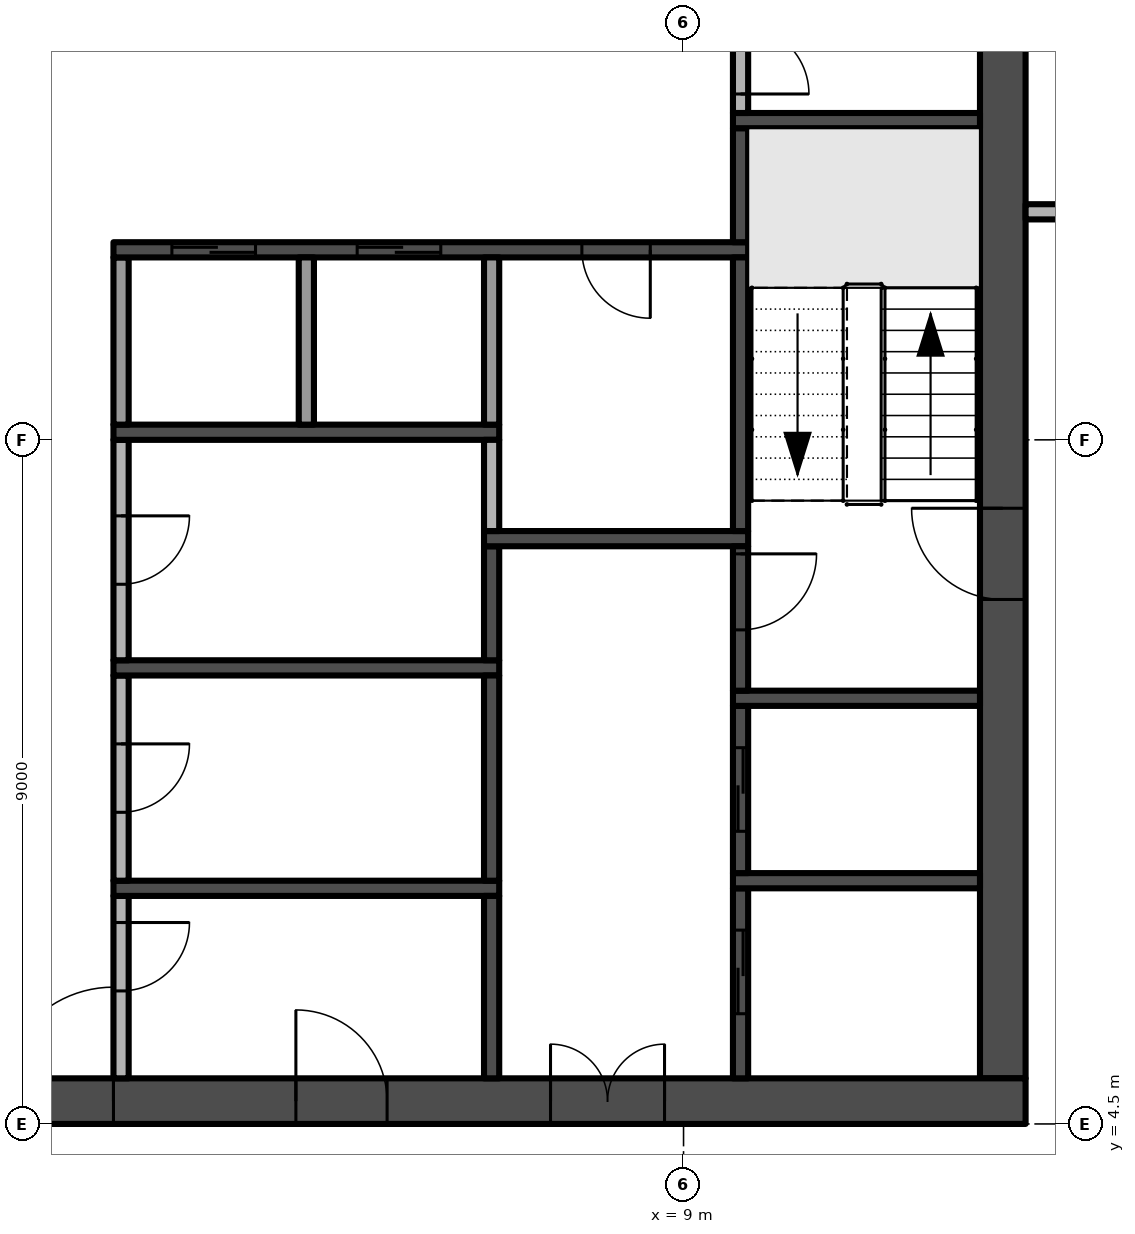
"""IFC4 building model, lengths in metres.
Left out: names, types, materials, properties, quantities, classifications, styles, units other than length and angle.
Written with IfcOpenShell. Run it as: python <this file> out.ifc"""

import sys

from ifc_helpers import new_model, si_unit, direction, frame, frame_2d, origin, place, context, subcontext, project, spatial, rectangle, extrude, element, fill, save


model = new_model("IFC4")
c1 = context("Model", 3, precision=1e-05, world=origin(), true_north=direction((0.0, 1.0)))
c2 = subcontext(c1, "Body", "Model", "MODEL_VIEW")
j1 = project(units=[si_unit("LENGTHUNIT", "METRE"), si_unit("PLANEANGLEUNIT", "RADIAN")], contexts=[c1])
p1 = place(None, origin())
s1 = spatial("IfcSite", under=j1, at=p1, CompositionType="ELEMENT")
p2 = place(p1, origin())
s2 = spatial("IfcBuilding", under=s1, at=p2, CompositionType="ELEMENT")
p3 = place(p2, frame((0.0, 0.0, 214.8)))
s3 = spatial("IfcBuildingStorey", under=s2, at=p3, CompositionType="ELEMENT", Elevation=214.8)
p4 = place(p3, frame((-13.5, 4.8, -0.3), z_axis=(0.0, 0.0, 1.0), x_axis=(1.0, 0.0, 0.0)))
e1 = element("IfcWall", 1, at=p4, inside=s3, PredefinedType="SHEAR", context=c2, shape_type="SweptSolid", body=[
    extrude(rectangle(XDim=27.0, YDim=0.6, at=frame_2d((13.5, 0.0))), origin(), (0.0, 0.0, 1.0), 3.8),
])
p5 = place(p4, frame((12.0, 0.0, 0.3)))
e2 = element("IfcOpeningElement", 2, at=p5, cuts=e1, PredefinedType="OPENING", context=c2, shape_type="SweptSolid", body=[
    extrude(rectangle(XDim=3.0, YDim=2.4, at=frame_2d((1.5, 1.2))), frame((0.0, 0.31, 0.0), z_axis=(0.0, -1.0, 0.0), x_axis=(1.0, 0.0, 0.0)), (0.0, 0.0, 1.0), 0.62),
])
p6 = place(p4, frame((4.9, 0.0, 0.3)))
e3 = element("IfcOpeningElement", 3, at=p6, cuts=e1, PredefinedType="OPENING", context=c2, shape_type="SweptSolid", body=[
    extrude(rectangle(XDim=1.2, YDim=2.2, at=frame_2d((0.6, 1.1))), frame((0.0, 0.31, 0.0), z_axis=(0.0, -1.0, 0.0), x_axis=(1.0, 0.0, 0.0)), (0.0, 0.0, 1.0), 0.62),
])
p7 = place(p4, frame((20.75, 0.0, 0.3)))
e4 = element("IfcOpeningElement", 4, at=p7, cuts=e1, PredefinedType="OPENING", context=c2, shape_type="SweptSolid", body=[
    extrude(rectangle(XDim=1.5, YDim=2.2, at=frame_2d((0.75, 1.1))), frame((0.0, 0.31, 0.0), z_axis=(0.0, -1.0, 0.0), x_axis=(1.0, 0.0, 0.0)), (0.0, 0.0, 1.0), 0.62),
])
p8 = place(p4, frame((17.4, 0.0, 0.3)))
e5 = element("IfcOpeningElement", 5, at=p8, cuts=e1, PredefinedType="OPENING", context=c2, shape_type="SweptSolid", body=[
    extrude(rectangle(XDim=1.2, YDim=2.2, at=frame_2d((0.6, 1.1))), frame((0.0, 0.31, 0.0), z_axis=(0.0, -1.0, 0.0), x_axis=(1.0, 0.0, 0.0)), (0.0, 0.0, 1.0), 0.62),
])
p9 = place(p3, frame((13.2, 5.1, -0.3), z_axis=(0.0, 0.0, 1.0), x_axis=(0.0, 1.0, 0.0)))
e6 = element("IfcWall", 6, at=p9, inside=s3, PredefinedType="SHEAR", context=c2, shape_type="SweptSolid", body=[
    extrude(rectangle(XDim=16.8, YDim=0.6, at=frame_2d((8.4, 0.0))), origin(), (0.0, 0.0, 1.0), 3.8),
])
p10 = place(p9, frame((6.3, 0.0, 0.3)))
e7 = element("IfcOpeningElement", 7, at=p10, cuts=e6, PredefinedType="OPENING", context=c2, shape_type="SweptSolid", body=[
    extrude(rectangle(XDim=1.2, YDim=2.2, at=frame_2d((0.6, 1.1))), frame((0.0, 0.31, 0.0), z_axis=(0.0, -1.0, 0.0), x_axis=(1.0, 0.0, 0.0)), (0.0, 0.0, 1.0), 0.62),
])
p11 = place(p3, frame((1.6, 7.5, 0.0), z_axis=(0.0, 0.0, 1.0), x_axis=(0.0, -1.0, 0.0)))
e8 = element("IfcWall", 8, at=p11, inside=s3, PredefinedType="PARTITIONING", context=c2, shape_type="SweptSolid", body=[
    extrude(rectangle(XDim=2.4, YDim=0.2, at=frame_2d((1.2, 0.0))), origin(), (0.0, 0.0, 1.0), 3.5),
])
p12 = place(p11, frame((0.35, 0.0, 0.0)))
e9 = element("IfcOpeningElement", 9, at=p12, cuts=e8, PredefinedType="OPENING", context=c2, shape_type="SweptSolid", body=[
    extrude(rectangle(XDim=0.9, YDim=2.1, at=frame_2d((0.45, 1.05))), frame((0.0, 0.11, 0.0), z_axis=(0.0, -1.0, 0.0), x_axis=(1.0, 0.0, 0.0)), (0.0, 0.0, 1.0), 0.22),
])
p13 = place(p3, frame((1.5, 7.6, 0.0), z_axis=(0.0, 0.0, 1.0), x_axis=(1.0, 0.0, 0.0)))
e10 = element("IfcWall", 10, at=p13, inside=s3, PredefinedType="SHEAR", context=c2, shape_type="SweptSolid", body=[
    extrude(rectangle(XDim=5.075, YDim=0.2, at=frame_2d((2.538, 0.0))), origin(), (0.0, 0.0, 1.0), 3.5),
])
p14 = place(p3, frame((1.6, 10.4, 0.0), z_axis=(0.0, 0.0, 1.0), x_axis=(0.0, -1.0, 0.0)))
e11 = element("IfcWall", 11, at=p14, inside=s3, PredefinedType="PARTITIONING", context=c2, shape_type="SweptSolid", body=[
    extrude(rectangle(XDim=2.7, YDim=0.2, at=frame_2d((1.35, 0.0))), origin(), (0.0, 0.0, 1.0), 3.5),
])
p15 = place(p14, frame((0.9, 0.0, 0.0)))
e12 = element("IfcOpeningElement", 12, at=p15, cuts=e11, PredefinedType="OPENING", context=c2, shape_type="SweptSolid", body=[
    extrude(rectangle(XDim=0.9, YDim=2.1, at=frame_2d((0.45, 1.05))), frame((0.0, 0.11, 0.0), z_axis=(0.0, -1.0, 0.0), x_axis=(1.0, 0.0, 0.0)), (0.0, 0.0, 1.0), 0.22),
])
p16 = place(p3, frame((1.5, 10.5, 0.0), z_axis=(0.0, 0.0, 1.0), x_axis=(1.0, 0.0, 0.0)))
e13 = element("IfcWall", 13, at=p16, inside=s3, PredefinedType="SHEAR", context=c2, shape_type="SweptSolid", body=[
    extrude(rectangle(XDim=5.075, YDim=0.2, at=frame_2d((2.538, 0.0))), origin(), (0.0, 0.0, 1.0), 3.5),
])
p17 = place(p3, frame((1.6, 13.5, 0.0), z_axis=(0.0, 0.0, 1.0), x_axis=(0.0, -1.0, 0.0)))
e14 = element("IfcWall", 14, at=p17, inside=s3, PredefinedType="PARTITIONING", context=c2, shape_type="SweptSolid", body=[
    extrude(rectangle(XDim=2.9, YDim=0.2, at=frame_2d((1.45, 0.0))), origin(), (0.0, 0.0, 1.0), 3.5),
])
p18 = place(p17, frame((1.0, 0.0, 0.0)))
e15 = element("IfcOpeningElement", 15, at=p18, cuts=e14, PredefinedType="OPENING", context=c2, shape_type="SweptSolid", body=[
    extrude(rectangle(XDim=0.9, YDim=2.1, at=frame_2d((0.45, 1.05))), frame((0.0, 0.11, 0.0), z_axis=(0.0, -1.0, 0.0), x_axis=(1.0, 0.0, 0.0)), (0.0, 0.0, 1.0), 0.22),
])
p19 = place(p3, frame((1.5, 13.6, 0.0), z_axis=(0.0, 0.0, 1.0), x_axis=(1.0, 0.0, 0.0)))
e16 = element("IfcWall", 16, at=p19, inside=s3, PredefinedType="SHEAR", context=c2, shape_type="SweptSolid", body=[
    extrude(rectangle(XDim=5.075, YDim=0.2, at=frame_2d((2.538, 0.0))), origin(), (0.0, 0.0, 1.0), 3.5),
])
p20 = place(p3, frame((1.6, 13.7, 0.0), z_axis=(0.0, 0.0, 1.0), x_axis=(0.0, 1.0, 0.0)))
e17 = element("IfcWall", 17, at=p20, inside=s3, PredefinedType="PARTITIONING", context=c2, shape_type="SweptSolid", body=[
    extrude(rectangle(XDim=2.2, YDim=0.2, at=frame_2d((1.1, 0.0))), origin(), (0.0, 0.0, 1.0), 3.5),
])
p21 = place(p3, frame((9.85, 16.0, 0.0), z_axis=(0.0, 0.0, 1.0), x_axis=(-1.0, 0.0, 0.0)))
e18 = element("IfcWall", 18, at=p21, inside=s3, PredefinedType="SHEAR", context=c2, shape_type="SweptSolid", body=[
    extrude(rectangle(XDim=8.35, YDim=0.2, at=frame_2d((4.175, 0.0))), origin(), (0.0, 0.0, 1.0), 3.5),
])
p22 = place(p21, frame((6.481, 0.0, 0.0)))
e19 = element("IfcOpeningElement", 19, at=p22, cuts=e18, PredefinedType="OPENING", context=c2, shape_type="SweptSolid", body=[
    extrude(rectangle(XDim=1.1, YDim=2.1, at=frame_2d((0.55, 1.05))), frame((0.0, 0.11, 0.0), z_axis=(0.0, -1.0, 0.0), x_axis=(1.0, 0.0, 0.0)), (0.0, 0.0, 1.0), 0.22),
])
p23 = place(p21, frame((4.044, 0.0, 0.0)))
e20 = element("IfcOpeningElement", 20, at=p23, cuts=e18, PredefinedType="OPENING", context=c2, shape_type="SweptSolid", body=[
    extrude(rectangle(XDim=1.1, YDim=2.1, at=frame_2d((0.55, 1.05))), frame((0.0, 0.11, 0.0), z_axis=(0.0, -1.0, 0.0), x_axis=(1.0, 0.0, 0.0)), (0.0, 0.0, 1.0), 0.22),
])
p24 = place(p21, frame((1.288, 0.0, 0.0)))
e21 = element("IfcOpeningElement", 21, at=p24, cuts=e18, PredefinedType="OPENING", context=c2, shape_type="SweptSolid", body=[
    extrude(rectangle(XDim=0.9, YDim=2.1, at=frame_2d((0.45, 1.05))), frame((0.0, 0.11, 0.0), z_axis=(0.0, -1.0, 0.0), x_axis=(1.0, 0.0, 0.0)), (0.0, 0.0, 1.0), 0.22),
])
p25 = place(p3, frame((4.037, 13.7, 0.0), z_axis=(0.0, 0.0, 1.0), x_axis=(0.0, 1.0, 0.0)))
e22 = element("IfcWall", 22, at=p25, inside=s3, PredefinedType="PARTITIONING", context=c2, shape_type="SweptSolid", body=[
    extrude(rectangle(XDim=2.2, YDim=0.2, at=frame_2d((1.1, 0.0))), origin(), (0.0, 0.0, 1.0), 3.5),
])
p26 = place(p3, frame((6.475, 5.1, 0.0), z_axis=(0.0, 0.0, 1.0), x_axis=(0.0, 1.0, 0.0)))
e23 = element("IfcWall", 23, at=p26, inside=s3, PredefinedType="SHEAR", context=c2, shape_type="SweptSolid", body=[
    extrude(rectangle(XDim=2.4, YDim=0.2, at=frame_2d((1.2, 0.0))), origin(), (0.0, 0.0, 1.0), 3.5),
])
p27 = place(p3, frame((6.475, 7.7, 0.0), z_axis=(0.0, 0.0, 1.0), x_axis=(0.0, 1.0, 0.0)))
e24 = element("IfcWall", 24, at=p27, inside=s3, PredefinedType="SHEAR", context=c2, shape_type="SweptSolid", body=[
    extrude(rectangle(XDim=2.7, YDim=0.2, at=frame_2d((1.35, 0.0))), origin(), (0.0, 0.0, 1.0), 3.5),
])
p28 = place(p3, frame((6.475, 10.6, 0.0), z_axis=(0.0, 0.0, 1.0), x_axis=(0.0, 1.0, 0.0)))
e25 = element("IfcWall", 25, at=p28, inside=s3, PredefinedType="SHEAR", context=c2, shape_type="SweptSolid", body=[
    extrude(rectangle(XDim=1.5, YDim=0.2, at=frame_2d((0.75, 0.0))), origin(), (0.0, 0.0, 1.0), 3.5),
])
p29 = place(p3, frame((6.375, 12.2, 0.0), z_axis=(0.0, 0.0, 1.0), x_axis=(1.0, 0.0, 0.0)))
e26 = element("IfcWall", 26, at=p29, inside=s3, PredefinedType="SHEAR", context=c2, shape_type="SweptSolid", body=[
    extrude(rectangle(XDim=3.475, YDim=0.2, at=frame_2d((1.738, 0.0))), origin(), (0.0, 0.0, 1.0), 3.5),
])
p30 = place(p3, frame((6.475, 12.3, 0.0), z_axis=(0.0, 0.0, 1.0), x_axis=(0.0, 1.0, 0.0)))
e27 = element("IfcWall", 27, at=p30, inside=s3, PredefinedType="PARTITIONING", context=c2, shape_type="SweptSolid", body=[
    extrude(rectangle(XDim=1.2, YDim=0.2, at=frame_2d((0.6, 0.0))), origin(), (0.0, 0.0, 1.0), 3.5),
])
p31 = place(p3, frame((6.475, 13.7, 0.0), z_axis=(0.0, 0.0, 1.0), x_axis=(0.0, 1.0, 0.0)))
e28 = element("IfcWall", 28, at=p31, inside=s3, PredefinedType="PARTITIONING", context=c2, shape_type="SweptSolid", body=[
    extrude(rectangle(XDim=2.2, YDim=0.2, at=frame_2d((1.1, 0.0))), origin(), (0.0, 0.0, 1.0), 3.5),
])
p32 = place(p3, frame((9.75, 5.1, 0.0), z_axis=(0.0, 0.0, 1.0), x_axis=(0.0, 1.0, 0.0)))
e29 = element("IfcWall", 29, at=p32, inside=s3, PredefinedType="SHEAR", context=c2, shape_type="SweptSolid", body=[
    extrude(rectangle(XDim=2.5, YDim=0.2, at=frame_2d((1.25, 0.0))), origin(), (0.0, 0.0, 1.0), 3.5),
])
p33 = place(p32, frame((0.85, 0.0, 0.0)))
e30 = element("IfcOpeningElement", 30, at=p33, cuts=e29, PredefinedType="OPENING", context=c2, shape_type="SweptSolid", body=[
    extrude(rectangle(XDim=1.1, YDim=2.1, at=frame_2d((0.55, 1.05))), frame((0.0, 0.11, 0.0), z_axis=(0.0, -1.0, 0.0), x_axis=(1.0, 0.0, 0.0)), (0.0, 0.0, 1.0), 0.22),
])
p34 = place(p3, frame((9.65, 7.7, 0.0), z_axis=(0.0, 0.0, 1.0), x_axis=(1.0, 0.0, 0.0)))
e31 = element("IfcWall", 31, at=p34, inside=s3, PredefinedType="SHEAR", context=c2, shape_type="SweptSolid", body=[
    extrude(rectangle(XDim=3.25, YDim=0.2, at=frame_2d((1.625, 0.0))), origin(), (0.0, 0.0, 1.0), 3.5),
])
p35 = place(p3, frame((9.75, 7.8, 0.0), z_axis=(0.0, 0.0, 1.0), x_axis=(0.0, 1.0, 0.0)))
e32 = element("IfcWall", 32, at=p35, inside=s3, PredefinedType="SHEAR", context=c2, shape_type="SweptSolid", body=[
    extrude(rectangle(XDim=2.2, YDim=0.2, at=frame_2d((1.1, 0.0))), origin(), (0.0, 0.0, 1.0), 3.5),
])
p36 = place(p35, frame((0.55, 0.0, 0.0)))
e33 = element("IfcOpeningElement", 33, at=p36, cuts=e32, PredefinedType="OPENING", context=c2, shape_type="SweptSolid", body=[
    extrude(rectangle(XDim=1.1, YDim=2.1, at=frame_2d((0.55, 1.05))), frame((0.0, 0.11, 0.0), z_axis=(0.0, -1.0, 0.0), x_axis=(1.0, 0.0, 0.0)), (0.0, 0.0, 1.0), 0.22),
])
p37 = place(p3, frame((9.65, 10.1, 0.0), z_axis=(0.0, 0.0, 1.0), x_axis=(1.0, 0.0, 0.0)))
e34 = element("IfcWall", 34, at=p37, inside=s3, PredefinedType="SHEAR", context=c2, shape_type="SweptSolid", body=[
    extrude(rectangle(XDim=3.25, YDim=0.2, at=frame_2d((1.625, 0.0))), origin(), (0.0, 0.0, 1.0), 3.5),
])
p38 = place(p3, frame((9.75, 12.1, 0.0), z_axis=(0.0, 0.0, 1.0), x_axis=(0.0, -1.0, 0.0)))
e35 = element("IfcWall", 35, at=p38, inside=s3, PredefinedType="SHEAR", context=c2, shape_type="SweptSolid", body=[
    extrude(rectangle(XDim=1.9, YDim=0.2, at=frame_2d((0.95, 0.0))), origin(), (0.0, 0.0, 1.0), 3.5),
])
p39 = place(p38, frame((0.1, 0.0, 0.0)))
e36 = element("IfcOpeningElement", 36, at=p39, cuts=e35, PredefinedType="OPENING", context=c2, shape_type="SweptSolid", body=[
    extrude(rectangle(XDim=1.0, YDim=2.2, at=frame_2d((0.5, 1.1))), frame((0.0, 0.11, 0.0), z_axis=(0.0, -1.0, 0.0), x_axis=(1.0, 0.0, 0.0)), (0.0, 0.0, 1.0), 0.22),
])
p40 = place(p3, frame((9.75, 12.3, 0.0), z_axis=(0.0, 0.0, 1.0), x_axis=(0.0, 1.0, 0.0)))
e37 = element("IfcWall", 37, at=p40, inside=s3, PredefinedType="SHEAR", context=c2, shape_type="SweptSolid", body=[
    extrude(rectangle(XDim=3.6, YDim=0.2, at=frame_2d((1.8, 0.0))), origin(), (0.0, 0.0, 1.0), 3.5),
])
p41 = place(p3, frame((9.75, 16.1, 0.0), z_axis=(0.0, 0.0, 1.0), x_axis=(0.0, 1.0, 0.0)))
e38 = element("IfcWall", 38, at=p41, inside=s3, PredefinedType="SHEAR", context=c2, shape_type="SweptSolid", body=[
    extrude(rectangle(XDim=1.5, YDim=0.2, at=frame_2d((0.75, 0.0))), origin(), (0.0, 0.0, 1.0), 3.5),
])
p42 = place(p3, frame((9.65, 17.7, 0.0), z_axis=(0.0, 0.0, 1.0), x_axis=(1.0, 0.0, 0.0)))
e39 = element("IfcWall", 39, at=p42, inside=s3, PredefinedType="SHEAR", context=c2, shape_type="SweptSolid", body=[
    extrude(rectangle(XDim=3.25, YDim=0.2, at=frame_2d((1.625, 0.0))), origin(), (0.0, 0.0, 1.0), 3.5),
])
p43 = place(p3, frame((9.75, 19.2, 0.0), z_axis=(0.0, 0.0, 1.0), x_axis=(0.0, -1.0, 0.0)))
e40 = element("IfcWall", 40, at=p43, inside=s3, PredefinedType="PARTITIONING", context=c2, shape_type="SweptSolid", body=[
    extrude(rectangle(XDim=1.4, YDim=0.2, at=frame_2d((0.7, 0.0))), origin(), (0.0, 0.0, 1.0), 3.5),
])
p44 = place(p43, frame((0.25, 0.0, 0.0)))
e41 = element("IfcOpeningElement", 41, at=p44, cuts=e40, PredefinedType="OPENING", context=c2, shape_type="SweptSolid", body=[
    extrude(rectangle(XDim=0.9, YDim=2.1, at=frame_2d((0.45, 1.05))), frame((0.0, 0.11, 0.0), z_axis=(0.0, -1.0, 0.0), x_axis=(1.0, 0.0, 0.0)), (0.0, 0.0, 1.0), 0.22),
])
p45 = place(p3, frame((13.5, 16.5, 0.0), z_axis=(0.0, 0.0, 1.0), x_axis=(1.0, 0.0, 0.0)))
e42 = element("IfcWall", 42, at=p45, inside=s3, PredefinedType="PARTITIONING", context=c2, shape_type="SweptSolid", body=[
    extrude(rectangle(XDim=3.825, YDim=0.2, at=frame_2d((1.913, 0.0))), origin(), (0.0, 0.0, 1.0), 3.5),
])
p46 = place(p45, frame((1.55, 0.0, 0.0)))
e43 = element("IfcOpeningElement", 43, at=p46, cuts=e42, PredefinedType="OPENING", context=c2, shape_type="SweptSolid", body=[
    extrude(rectangle(XDim=0.9, YDim=2.1, at=frame_2d((0.45, 1.05))), frame((0.0, 0.11, 0.0), z_axis=(0.0, -1.0, 0.0), x_axis=(1.0, 0.0, 0.0)), (0.0, 0.0, 1.0), 0.22),
])
p47 = place(p5, frame((3.0, 0.0, 0.0), z_axis=(0.0, 0.0, 1.0), x_axis=(-1.0, 0.0, 0.0)))
e44 = element("IfcDoor", 44, at=p47, inside=s3, OperationType="DOUBLE_DOOR_SINGLE_SWING", PredefinedType="DOOR", context=c2, shape_type="SweptSolid", body=[
    extrude(rectangle(XDim=3.0, YDim=2.4, at=frame_2d((1.5, 1.2))), frame((0.0, 0.025, 0.0), z_axis=(0.0, -1.0, 0.0), x_axis=(1.0, 0.0, 0.0)), (0.0, 0.0, 1.0), 0.05),
])
fill(e2, e44)
p48 = place(p10, frame((1.2, 0.0, 0.0), z_axis=(0.0, 0.0, 1.0), x_axis=(-1.0, 0.0, 0.0)))
e45 = element("IfcDoor", 45, at=p48, inside=s3, OperationType="SINGLE_SWING_LEFT", PredefinedType="DOOR", context=c2, shape_type="SweptSolid", body=[
    extrude(rectangle(XDim=1.2, YDim=2.2, at=frame_2d((0.6, 1.1))), frame((0.0, 0.025, 0.0), z_axis=(0.0, -1.0, 0.0), x_axis=(1.0, 0.0, 0.0)), (0.0, 0.0, 1.0), 0.05),
])
fill(e7, e45)
p49 = place(p7, frame((1.5, 0.0, 0.0), z_axis=(0.0, 0.0, 1.0), x_axis=(-1.0, 0.0, 0.0)))
e46 = element("IfcDoor", 46, at=p49, inside=s3, OperationType="DOUBLE_DOOR_SINGLE_SWING", PredefinedType="DOOR", context=c2, shape_type="SweptSolid", body=[
    extrude(rectangle(XDim=1.5, YDim=2.2, at=frame_2d((0.75, 1.1))), frame((0.0, 0.025, 0.0), z_axis=(0.0, -1.0, 0.0), x_axis=(1.0, 0.0, 0.0)), (0.0, 0.0, 1.0), 0.05),
])
fill(e4, e46)
p50 = place(p8, frame((1.2, 0.0, 0.0), z_axis=(0.0, 0.0, 1.0), x_axis=(-1.0, 0.0, 0.0)))
e47 = element("IfcDoor", 47, at=p50, inside=s3, OperationType="SINGLE_SWING_RIGHT", PredefinedType="DOOR", context=c2, shape_type="SweptSolid", body=[
    extrude(rectangle(XDim=1.2, YDim=2.2, at=frame_2d((0.6, 1.1))), frame((0.0, 0.025, 0.0), z_axis=(0.0, -1.0, 0.0), x_axis=(1.0, 0.0, 0.0)), (0.0, 0.0, 1.0), 0.05),
])
fill(e5, e47)
p51 = place(p39, origin())
e48 = element("IfcDoor", 48, at=p51, inside=s3, OperationType="SINGLE_SWING_LEFT", PredefinedType="DOOR", context=c2, shape_type="SweptSolid", body=[
    extrude(rectangle(XDim=1.0, YDim=2.2, at=frame_2d((0.5, 1.1))), frame((0.0, 0.025, 0.0), z_axis=(0.0, -1.0, 0.0), x_axis=(1.0, 0.0, 0.0)), (0.0, 0.0, 1.0), 0.05),
])
fill(e36, e48)
p52 = place(p22, origin())
e49 = element("IfcDoor", 49, at=p52, inside=s3, OperationType="SLIDING_TO_RIGHT", PredefinedType="DOOR", context=c2, shape_type="SweptSolid", body=[
    extrude(rectangle(XDim=1.1, YDim=2.1, at=frame_2d((0.55, 1.05))), frame((0.0, 0.025, 0.0), z_axis=(0.0, -1.0, 0.0), x_axis=(1.0, 0.0, 0.0)), (0.0, 0.0, 1.0), 0.05),
])
fill(e19, e49)
p53 = place(p23, origin())
e50 = element("IfcDoor", 50, at=p53, inside=s3, OperationType="SLIDING_TO_RIGHT", PredefinedType="DOOR", context=c2, shape_type="SweptSolid", body=[
    extrude(rectangle(XDim=1.1, YDim=2.1, at=frame_2d((0.55, 1.05))), frame((0.0, 0.025, 0.0), z_axis=(0.0, -1.0, 0.0), x_axis=(1.0, 0.0, 0.0)), (0.0, 0.0, 1.0), 0.05),
])
fill(e20, e50)
p54 = place(p33, origin())
e51 = element("IfcDoor", 51, at=p54, inside=s3, OperationType="SLIDING_TO_RIGHT", PredefinedType="DOOR", context=c2, shape_type="SweptSolid", body=[
    extrude(rectangle(XDim=1.1, YDim=2.1, at=frame_2d((0.55, 1.05))), frame((0.0, 0.025, 0.0), z_axis=(0.0, -1.0, 0.0), x_axis=(1.0, 0.0, 0.0)), (0.0, 0.0, 1.0), 0.05),
])
fill(e30, e51)
p55 = place(p36, origin())
e52 = element("IfcDoor", 52, at=p55, inside=s3, OperationType="SLIDING_TO_RIGHT", PredefinedType="DOOR", context=c2, shape_type="SweptSolid", body=[
    extrude(rectangle(XDim=1.1, YDim=2.1, at=frame_2d((0.55, 1.05))), frame((0.0, 0.025, 0.0), z_axis=(0.0, -1.0, 0.0), x_axis=(1.0, 0.0, 0.0)), (0.0, 0.0, 1.0), 0.05),
])
fill(e33, e52)
p56 = place(p12, origin())
e53 = element("IfcDoor", 53, at=p56, inside=s3, OperationType="SINGLE_SWING_LEFT", PredefinedType="DOOR", context=c2, shape_type="SweptSolid", body=[
    extrude(rectangle(XDim=0.9, YDim=2.1, at=frame_2d((0.45, 1.05))), frame((0.0, 0.025, 0.0), z_axis=(0.0, -1.0, 0.0), x_axis=(1.0, 0.0, 0.0)), (0.0, 0.0, 1.0), 0.05),
])
fill(e9, e53)
p57 = place(p15, origin())
e54 = element("IfcDoor", 54, at=p57, inside=s3, OperationType="SINGLE_SWING_LEFT", PredefinedType="DOOR", context=c2, shape_type="SweptSolid", body=[
    extrude(rectangle(XDim=0.9, YDim=2.1, at=frame_2d((0.45, 1.05))), frame((0.0, 0.025, 0.0), z_axis=(0.0, -1.0, 0.0), x_axis=(1.0, 0.0, 0.0)), (0.0, 0.0, 1.0), 0.05),
])
fill(e12, e54)
p58 = place(p18, origin())
e55 = element("IfcDoor", 55, at=p58, inside=s3, OperationType="SINGLE_SWING_LEFT", PredefinedType="DOOR", context=c2, shape_type="SweptSolid", body=[
    extrude(rectangle(XDim=0.9, YDim=2.1, at=frame_2d((0.45, 1.05))), frame((0.0, 0.025, 0.0), z_axis=(0.0, -1.0, 0.0), x_axis=(1.0, 0.0, 0.0)), (0.0, 0.0, 1.0), 0.05),
])
fill(e15, e55)
p59 = place(p24, origin())
e56 = element("IfcDoor", 56, at=p59, inside=s3, OperationType="SINGLE_SWING_LEFT", PredefinedType="DOOR", context=c2, shape_type="SweptSolid", body=[
    extrude(rectangle(XDim=0.9, YDim=2.1, at=frame_2d((0.45, 1.05))), frame((0.0, 0.025, 0.0), z_axis=(0.0, -1.0, 0.0), x_axis=(1.0, 0.0, 0.0)), (0.0, 0.0, 1.0), 0.05),
])
fill(e21, e56)
p60 = place(p44, origin())
e57 = element("IfcDoor", 57, at=p60, inside=s3, OperationType="SINGLE_SWING_RIGHT", PredefinedType="DOOR", context=c2, shape_type="SweptSolid", body=[
    extrude(rectangle(XDim=0.9, YDim=2.1, at=frame_2d((0.45, 1.05))), frame((0.0, 0.025, 0.0), z_axis=(0.0, -1.0, 0.0), x_axis=(1.0, 0.0, 0.0)), (0.0, 0.0, 1.0), 0.05),
])
fill(e41, e57)
save(model, sys.argv[1])
